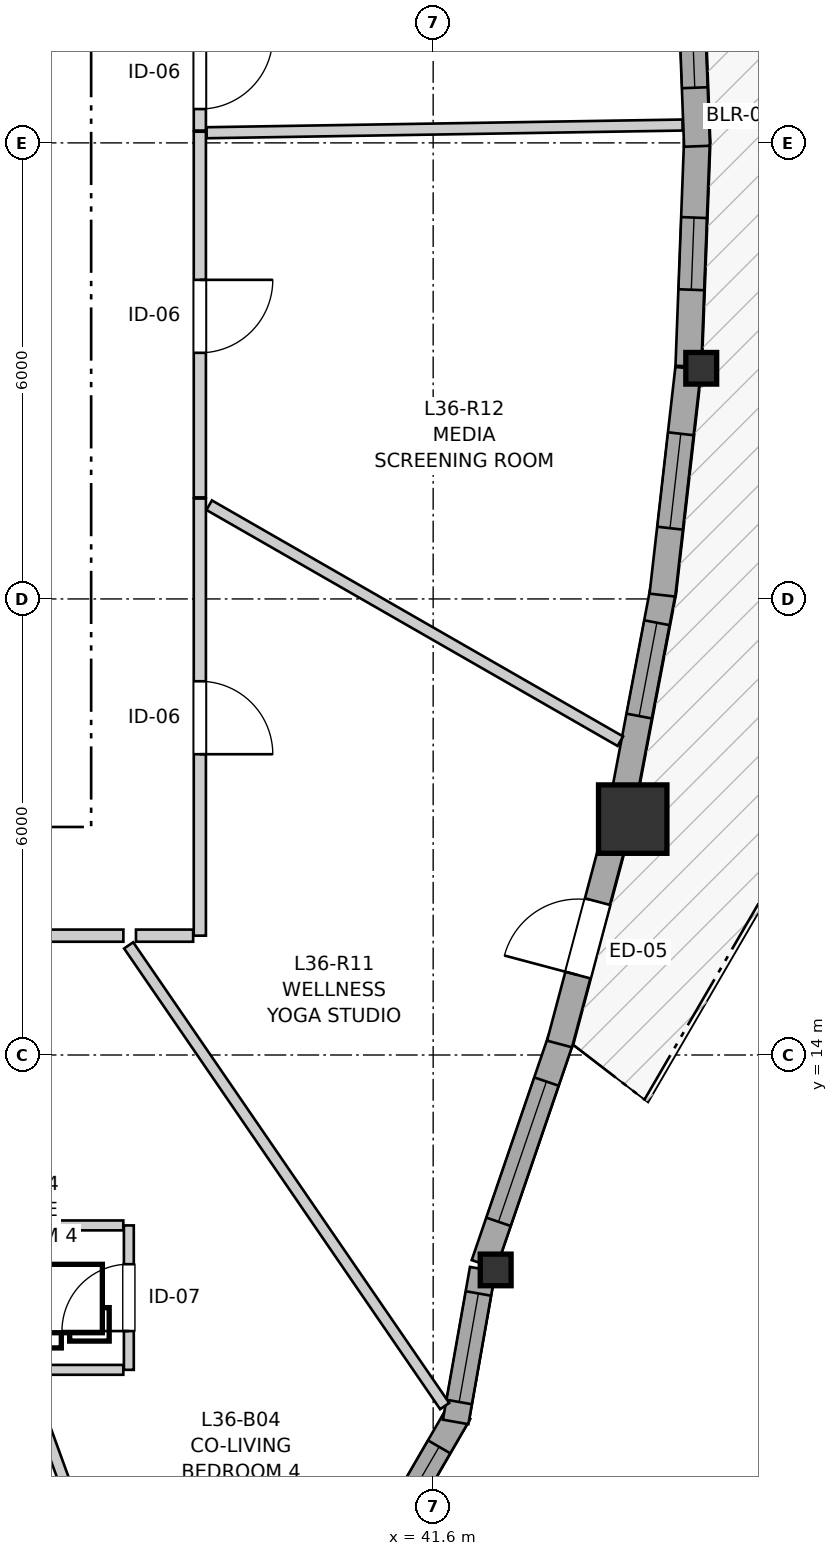
"""IFC4 building model, lengths in metres.
Left out: names, types, materials, properties, quantities, classifications, styles, units other than length and angle.
Written with IfcOpenShell. Run it as: python <this file> out.ifc"""

import sys

from ifc_helpers import new_model, si_unit, direction, frame, frame_2d, origin, origin_2d, place, context, subcontext, project, spatial, rectangle, i_section, extrude, source, transform, mapped, element, fill, save


model = new_model("IFC4")
c1 = context("Model", 3, precision=1e-05, world=origin(), true_north=direction((0.0, 1.0)))
c2 = subcontext(c1, "Body", "Model", "MODEL_VIEW")
j1 = project(units=[si_unit("LENGTHUNIT", "METRE"), si_unit("PLANEANGLEUNIT", "RADIAN")], contexts=[c1])
p1 = place(None, origin())
s1 = spatial("IfcSite", under=j1, at=p1, CompositionType="ELEMENT")
p2 = place(p1, origin())
s2 = spatial("IfcBuilding", under=s1, at=p2, CompositionType="ELEMENT")
p3 = place(p2, frame((0.0, 0.0, 121.6)))
s3 = spatial("IfcBuildingStorey", under=s2, at=p3, CompositionType="ELEMENT", Elevation=121.6)
m1 = source(origin(), c2, "Body", "SweptSolid", [
    extrude(i_section(OverallWidth=0.406, OverallDepth=0.416, WebThickness=0.027, FlangeThickness=0.044, FilletRadius=0.015, at=origin_2d()), origin(), (0.0, 0.0, 1.0), 2.95),
])
p4 = place(p3, frame((42.423, 11.172, 0.0), z_axis=(0.0, 0.0, 1.0), x_axis=(1.0, 0.0, 0.0)))
e1 = element("IfcColumn", 1, at=p4, inside=s3, PredefinedType="PILASTER", context=c2, shape_type="MappedRepresentation", body=[
    mapped(m1, transform((0.0, 0.0, 0.0), x_axis=(1.0, 0.0, 0.0), y_axis=(0.0, 1.0, 0.0), z_axis=(0.0, 0.0, 1.0), scale=1.0)),
])
m2 = source(origin(), c2, "Body", "SweptSolid", [
    extrude(rectangle(XDim=0.9, YDim=0.9, at=origin_2d()), origin(), (0.0, 0.0, 1.0), 2.95),
])
p5 = place(p3, frame((44.226, 17.104, 0.0), z_axis=(0.0, 0.0, 1.0), x_axis=(1.0, 0.0, 0.0)))
e2 = element("IfcColumn", 2, at=p5, inside=s3, PredefinedType="COLUMN", context=c2, shape_type="MappedRepresentation", body=[
    mapped(m2, transform((0.0, 0.0, 0.0), x_axis=(1.0, 0.0, 0.0), y_axis=(0.0, 1.0, 0.0), z_axis=(0.0, 0.0, 1.0), scale=1.0)),
])
p6 = place(p3, frame((45.127, 23.034, 0.0), z_axis=(0.0, 0.0, 1.0), x_axis=(1.0, 0.0, 0.0)))
e3 = element("IfcColumn", 3, at=p6, inside=s3, PredefinedType="PILASTER", context=c2, shape_type="MappedRepresentation", body=[
    mapped(m1, transform((0.0, 0.0, 0.0), x_axis=(1.0, 0.0, 0.0), y_axis=(0.0, 1.0, 0.0), z_axis=(0.0, 0.0, 1.0), scale=1.0)),
])
p7 = place(p3, frame((40.888, 7.483, 0.0), z_axis=(0.0, 0.0, 1.0), x_axis=(0.501902596059, 0.864924149315, 0.0)))
e4 = element("IfcWall", 4, at=p7, inside=s3, PredefinedType="SOLIDWALL", context=c2, shape_type="SweptSolid", body=[
    extrude(rectangle(XDim=2.099, YDim=0.34, at=frame_2d((1.049, 0.0))), origin(), (0.0, 0.0, 1.0), 2.48),
])
p8 = place(p7, frame((0.524, 0.0, 0.82)))
e5 = element("IfcOpeningElement", 5, at=p8, cuts=e4, PredefinedType="OPENING", context=c2, shape_type="SweptSolid", body=[
    extrude(rectangle(XDim=1.05, YDim=1.45, at=frame_2d((0.525, 0.725))), frame((0.0, 0.18, 0.0), z_axis=(0.0, -1.0, 0.0), x_axis=(1.0, 0.0, 0.0)), (0.0, 0.0, 1.0), 0.36),
])
p9 = place(p3, frame((41.896, 9.173, 0.0), z_axis=(0.0, 0.0, 1.0), x_axis=(0.174399433509, 0.984674990843, 0.0)))
e6 = element("IfcWall", 6, at=p9, inside=s3, PredefinedType="SOLIDWALL", context=c2, shape_type="SweptSolid", body=[
    extrude(rectangle(XDim=2.041, YDim=0.34, at=frame_2d((1.021, 0.0))), origin(), (0.0, 0.0, 1.0), 2.48),
])
p10 = place(p9, frame((0.267, 0.0, 0.82)))
e7 = element("IfcOpeningElement", 7, at=p10, cuts=e6, PredefinedType="OPENING", context=c2, shape_type="SweptSolid", body=[
    extrude(rectangle(XDim=1.45, YDim=1.25, at=frame_2d((0.725, 0.625))), frame((0.0, 0.18, 0.0), z_axis=(0.0, -1.0, 0.0), x_axis=(1.0, 0.0, 0.0)), (0.0, 0.0, 1.0), 0.36),
])
p11 = place(p3, frame((42.268, 11.246, 0.0), z_axis=(0.0, 0.0, 1.0), x_axis=(0.323583674973, 0.946199558915, 0.0)))
e8 = element("IfcWall", 8, at=p11, inside=s3, PredefinedType="SOLIDWALL", context=c2, shape_type="SweptSolid", body=[
    extrude(rectangle(XDim=3.152, YDim=0.34, at=frame_2d((1.576, 0.0))), origin(), (0.0, 0.0, 1.0), 2.48),
])
p12 = place(p11, frame((0.591, 0.0, 0.82)))
e9 = element("IfcOpeningElement", 9, at=p12, cuts=e8, PredefinedType="OPENING", context=c2, shape_type="SweptSolid", body=[
    extrude(rectangle(XDim=1.95, YDim=1.4, at=frame_2d((0.975, 0.7))), frame((0.0, 0.18, 0.0), z_axis=(0.0, -1.0, 0.0), x_axis=(1.0, 0.0, 0.0)), (0.0, 0.0, 1.0), 0.36),
])
p13 = place(p3, frame((43.263, 14.145, 0.0), z_axis=(0.0, 0.0, 1.0), x_axis=(0.257086792151, 0.96638831807, 0.0)))
e10 = element("IfcWall", 10, at=p13, inside=s3, PredefinedType="SOLIDWALL", context=c2, shape_type="SweptSolid", body=[
    extrude(rectangle(XDim=2.876, YDim=0.34, at=frame_2d((1.438, 0.0))), origin(), (0.0, 0.0, 1.0), 2.48),
])
p14 = place(p13, frame((0.938, 0.0, 0.0)))
e11 = element("IfcOpeningElement", 11, at=p14, cuts=e10, PredefinedType="OPENING", context=c2, shape_type="SweptSolid", body=[
    extrude(rectangle(XDim=1.0, YDim=2.1, at=frame_2d((0.5, 1.05))), frame((0.0, 0.18, 0.0), z_axis=(0.0, -1.0, 0.0), x_axis=(1.0, 0.0, 0.0)), (0.0, 0.0, 1.0), 0.36),
])
p15 = place(p3, frame((44.101, 17.361, 0.0), z_axis=(0.0, 0.0, 1.0), x_axis=(0.186739007234, 0.982409559795, 0.0)))
e12 = element("IfcWall", 12, at=p15, inside=s3, PredefinedType="SOLIDWALL", context=c2, shape_type="SweptSolid", body=[
    extrude(rectangle(XDim=2.827, YDim=0.34, at=frame_2d((1.413, 0.0))), origin(), (0.0, 0.0, 1.0), 2.48),
])
p16 = place(p15, frame((1.118, 0.0, 0.82)))
e13 = element("IfcOpeningElement", 13, at=p16, cuts=e12, PredefinedType="OPENING", context=c2, shape_type="SweptSolid", body=[
    extrude(rectangle(XDim=1.25, YDim=1.35, at=frame_2d((0.625, 0.675))), frame((0.0, 0.18, 0.0), z_axis=(0.0, -1.0, 0.0), x_axis=(1.0, 0.0, 0.0)), (0.0, 0.0, 1.0), 0.36),
])
p17 = place(p3, frame((44.616, 20.05, 0.0), z_axis=(0.0, 0.0, 1.0), x_axis=(0.113250801133, 0.993566432627, 0.0)))
e14 = element("IfcWall", 14, at=p17, inside=s3, PredefinedType="SOLIDWALL", context=c2, shape_type="SweptSolid", body=[
    extrude(rectangle(XDim=3.003, YDim=0.34, at=frame_2d((1.501, 0.0))), origin(), (0.0, 0.0, 1.0), 2.48),
])
p18 = place(p17, frame((0.886, 0.0, 0.82)))
e15 = element("IfcOpeningElement", 15, at=p18, cuts=e14, PredefinedType="OPENING", context=c2, shape_type="SweptSolid", body=[
    extrude(rectangle(XDim=1.25, YDim=1.35, at=frame_2d((0.625, 0.675))), frame((0.0, 0.18, 0.0), z_axis=(0.0, -1.0, 0.0), x_axis=(1.0, 0.0, 0.0)), (0.0, 0.0, 1.0), 0.36),
])
p19 = place(p3, frame((44.958, 23.061, 0.0), z_axis=(0.0, 0.0, 1.0), x_axis=(0.037940097137, 0.999280015326, 0.0)))
e16 = element("IfcWall", 16, at=p19, inside=s3, PredefinedType="SOLIDWALL", context=c2, shape_type="SweptSolid", body=[
    extrude(rectangle(XDim=2.986, YDim=0.34, at=frame_2d((1.493, 0.0))), origin(), (0.0, 0.0, 1.0), 2.48),
])
p20 = place(p19, frame((1.008, 0.0, 0.82)))
e17 = element("IfcOpeningElement", 17, at=p20, cuts=e16, PredefinedType="OPENING", context=c2, shape_type="SweptSolid", body=[
    extrude(rectangle(XDim=0.95, YDim=1.35, at=frame_2d((0.475, 0.675))), frame((0.0, 0.18, 0.0), z_axis=(0.0, -1.0, 0.0), x_axis=(1.0, 0.0, 0.0)), (0.0, 0.0, 1.0), 0.36),
])
p21 = place(p3, frame((45.071, 25.956, 0.0), z_axis=(0.0, 0.0, 1.0), x_axis=(-0.037997361734, 0.999277839493, 0.0)))
e18 = element("IfcWall", 18, at=p21, inside=s3, PredefinedType="SOLIDWALL", context=c2, shape_type="SweptSolid", body=[
    extrude(rectangle(XDim=2.776, YDim=0.34, at=frame_2d((1.388, 0.0))), origin(), (0.0, 0.0, 1.0), 2.48),
])
p22 = place(p21, frame((0.771, 0.0, 0.82)))
e19 = element("IfcOpeningElement", 19, at=p22, cuts=e18, PredefinedType="OPENING", context=c2, shape_type="SweptSolid", body=[
    extrude(rectangle(XDim=1.45, YDim=1.25, at=frame_2d((0.725, 0.625))), frame((0.0, 0.18, 0.0), z_axis=(0.0, -1.0, 0.0), x_axis=(1.0, 0.0, 0.0)), (0.0, 0.0, 1.0), 0.36),
])
p23 = place(p3, frame((38.53, 21.321, 0.0), z_axis=(0.0, 0.0, 1.0), x_axis=(0.0, -1.0, 0.0)))
e20 = element("IfcWall", 20, at=p23, inside=s3, PredefinedType="PARTITIONING", context=c2, shape_type="SweptSolid", body=[
    extrude(rectangle(XDim=5.751, YDim=0.16, at=frame_2d((2.875, 0.0))), origin(), (0.0, 0.0, 1.0), 2.95),
])
p24 = place(p23, frame((2.404, 0.0, 0.0)))
e21 = element("IfcOpeningElement", 21, at=p24, cuts=e20, PredefinedType="OPENING", context=c2, shape_type="SweptSolid", body=[
    extrude(rectangle(XDim=0.96, YDim=2.1, at=frame_2d((0.48, 1.05))), frame((0.0, 0.09, 0.0), z_axis=(0.0, -1.0, 0.0), x_axis=(1.0, 0.0, 0.0)), (0.0, 0.0, 1.0), 0.18),
])
p25 = place(p3, frame((38.53, 26.147, 0.0), z_axis=(0.0, 0.0, 1.0), x_axis=(0.0, -1.0, 0.0)))
e22 = element("IfcWall", 22, at=p25, inside=s3, PredefinedType="PARTITIONING", context=c2, shape_type="SweptSolid", body=[
    extrude(rectangle(XDim=4.811, YDim=0.16, at=frame_2d((2.406, 0.0))), origin(), (0.0, 0.0, 1.0), 2.95),
])
p26 = place(p25, frame((1.949, 0.0, 0.0)))
e23 = element("IfcOpeningElement", 23, at=p26, cuts=e22, PredefinedType="OPENING", context=c2, shape_type="SweptSolid", body=[
    extrude(rectangle(XDim=0.96, YDim=2.1, at=frame_2d((0.48, 1.05))), frame((0.0, 0.09, 0.0), z_axis=(0.0, -1.0, 0.0), x_axis=(1.0, 0.0, 0.0)), (0.0, 0.0, 1.0), 0.18),
])
p27 = place(p3, frame((37.524, 15.57, 0.0), z_axis=(0.0, 0.0, 1.0), x_axis=(-1.0, 0.0, 0.0)))
e24 = element("IfcWall", 24, at=p27, inside=s3, PredefinedType="PARTITIONING", context=c2, shape_type="SweptSolid", body=[
    extrude(rectangle(XDim=3.401, YDim=0.16, at=frame_2d((1.7, 0.0))), origin(), (0.0, 0.0, 1.0), 2.95),
])
p28 = place(p27, frame((1.241, 0.0, 0.0)))
e25 = element("IfcOpeningElement", 25, at=p28, cuts=e24, PredefinedType="OPENING", context=c2, shape_type="SweptSolid", body=[
    extrude(rectangle(XDim=0.92, YDim=2.1, at=frame_2d((0.46, 1.05))), frame((0.0, 0.09, 0.0), z_axis=(0.0, -1.0, 0.0), x_axis=(1.0, 0.0, 0.0)), (0.0, 0.0, 1.0), 0.18),
])
p29 = place(p3, frame((37.596, 9.858, 0.0), z_axis=(0.0, 0.0, 1.0), x_axis=(0.0, 1.0, 0.0)))
e26 = element("IfcWall", 26, at=p29, inside=s3, PredefinedType="PARTITIONING", context=c2, shape_type="SweptSolid", body=[
    extrude(rectangle(XDim=1.9, YDim=0.13, at=frame_2d((0.95, 0.0))), origin(), (0.0, 0.0, 1.0), 2.95),
])
p30 = place(p29, frame((0.51, 0.0, 0.0)))
e27 = element("IfcOpeningElement", 27, at=p30, cuts=e26, PredefinedType="OPENING", context=c2, shape_type="SweptSolid", body=[
    extrude(rectangle(XDim=0.88, YDim=2.05, at=frame_2d((0.44, 1.025))), frame((0.0, 0.075, 0.0), z_axis=(0.0, -1.0, 0.0), x_axis=(1.0, 0.0, 0.0)), (0.0, 0.0, 1.0), 0.15),
])
p31 = place(p3, frame((38.53, 27.688, 0.0), z_axis=(0.0, 0.0, 1.0), x_axis=(0.0, -1.0, 0.0)))
e28 = element("IfcWall", 28, at=p31, inside=s3, PredefinedType="PARTITIONING", context=c2, shape_type="SweptSolid", body=[
    extrude(rectangle(XDim=1.526, YDim=0.16, at=frame_2d((0.763, 0.0))), origin(), (0.0, 0.0, 1.0), 2.95),
])
p32 = place(p31, frame((0.283, 0.0, 0.0)))
e29 = element("IfcOpeningElement", 29, at=p32, cuts=e28, PredefinedType="OPENING", context=c2, shape_type="SweptSolid", body=[
    extrude(rectangle(XDim=0.96, YDim=2.1, at=frame_2d((0.48, 1.05))), frame((0.0, 0.09, 0.0), z_axis=(0.0, -1.0, 0.0), x_axis=(1.0, 0.0, 0.0)), (0.0, 0.0, 1.0), 0.18),
])
p33 = place(p3, frame((37.594, 15.442, 0.0), z_axis=(0.0, 0.0, 1.0), x_axis=(0.565681325722, -0.824623937155, 0.0)))
e30 = element("IfcWall", 30, at=p33, inside=s3, PredefinedType="PARTITIONING", context=c2, shape_type="SweptSolid", body=[
    extrude(rectangle(XDim=7.35, YDim=0.145, at=frame_2d((3.675, 0.0))), origin(), (0.0, 0.0, 1.0), 2.95),
])
p34 = place(p3, frame((38.653, 21.233, 0.0), z_axis=(0.0, 0.0, 1.0), x_axis=(0.86726592845, -0.49784516604, 0.0)))
e31 = element("IfcWall", 31, at=p34, inside=s3, PredefinedType="PARTITIONING", context=c2, shape_type="SweptSolid", body=[
    extrude(rectangle(XDim=6.237, YDim=0.145, at=frame_2d((3.119, 0.0))), origin(), (0.0, 0.0, 1.0), 2.95),
])
p35 = place(p3, frame((38.619, 26.133, 0.0), z_axis=(0.0, 0.0, 1.0), x_axis=(0.999869130012, 0.016177850558, 0.0)))
e32 = element("IfcWall", 32, at=p35, inside=s3, PredefinedType="PARTITIONING", context=c2, shape_type="SweptSolid", body=[
    extrude(rectangle(XDim=6.263, YDim=0.145, at=frame_2d((3.131, 0.0))), origin(), (0.0, 0.0, 1.0), 2.95),
])
p36 = place(p3, frame((36.208, 9.873, 0.0), z_axis=(0.0, 0.0, 1.0), x_axis=(0.341362804218, -0.939931612351, 0.0)))
e33 = element("IfcWall", 33, at=p36, inside=s3, PredefinedType="PARTITIONING", context=c2, shape_type="SweptSolid", body=[
    extrude(rectangle(XDim=4.279, YDim=0.145, at=frame_2d((2.14, 0.0))), origin(), (0.0, 0.0, 1.0), 2.95),
])
p37 = place(p3, frame((35.796, 11.758, 0.0), z_axis=(0.0, 0.0, 1.0), x_axis=(1.0, 0.0, 0.0)))
e34 = element("IfcWall", 34, at=p37, inside=s3, PredefinedType="PARTITIONING", context=c2, shape_type="SweptSolid", body=[
    extrude(rectangle(XDim=1.727, YDim=0.13, at=frame_2d((0.864, 0.0))), origin(), (0.0, 0.0, 1.0), 2.95),
])
p38 = place(p3, frame((36.323, 9.858, 0.0), z_axis=(0.0, 0.0, 1.0), x_axis=(1.0, 0.0, 0.0)))
e35 = element("IfcWall", 35, at=p38, inside=s3, PredefinedType="PARTITIONING", context=c2, shape_type="SweptSolid", body=[
    extrude(rectangle(XDim=1.2, YDim=0.13, at=frame_2d((0.6, 0.0))), origin(), (0.0, 0.0, 1.0), 2.95),
])
p39 = place(p3, frame((37.69, 15.57, 0.0), z_axis=(0.0, 0.0, 1.0), x_axis=(1.0, 0.0, 0.0)))
e36 = element("IfcWall", 36, at=p39, inside=s3, PredefinedType="PARTITIONING", context=c2, shape_type="SweptSolid", body=[
    extrude(rectangle(XDim=0.752, YDim=0.16, at=frame_2d((0.376, 0.0))), origin(), (0.0, 0.0, 1.0), 2.95),
])
m3 = source(origin(), c2, "Body", "SweptSolid", [
    extrude(rectangle(XDim=1.05, YDim=1.45, at=frame_2d((0.525, 0.725))), frame((0.0, 0.03, 0.0), z_axis=(0.0, -1.0, 0.0), x_axis=(1.0, 0.0, 0.0)), (0.0, 0.0, 1.0), 0.06),
])
p40 = place(p8, origin())
e37 = element("IfcWindow", 37, at=p40, inside=s3, PartitioningType="SINGLE_PANEL", PredefinedType="WINDOW", context=c2, shape_type="MappedRepresentation", body=[
    mapped(m3, transform((0.0, 0.0, 0.0), x_axis=(1.0, 0.0, 0.0), y_axis=(0.0, 1.0, 0.0), z_axis=(0.0, 0.0, 1.0), scale=1.0)),
])
fill(e5, e37)
m4 = source(origin(), c2, "Body", "SweptSolid", [
    extrude(rectangle(XDim=1.45, YDim=1.25, at=frame_2d((0.725, 0.625))), frame((0.0, 0.03, 0.0), z_axis=(0.0, -1.0, 0.0), x_axis=(1.0, 0.0, 0.0)), (0.0, 0.0, 1.0), 0.06),
])
p41 = place(p10, origin())
e38 = element("IfcWindow", 38, at=p41, inside=s3, PartitioningType="SINGLE_PANEL", PredefinedType="WINDOW", context=c2, shape_type="MappedRepresentation", body=[
    mapped(m4, transform((0.0, 0.0, 0.0), x_axis=(1.0, 0.0, 0.0), y_axis=(0.0, 1.0, 0.0), z_axis=(0.0, 0.0, 1.0), scale=1.0)),
])
fill(e7, e38)
m5 = source(origin(), c2, "Body", "SweptSolid", [
    extrude(rectangle(XDim=1.95, YDim=1.4, at=frame_2d((0.975, 0.7))), frame((0.0, 0.03, 0.0), z_axis=(0.0, -1.0, 0.0), x_axis=(1.0, 0.0, 0.0)), (0.0, 0.0, 1.0), 0.06),
])
p42 = place(p12, origin())
e39 = element("IfcWindow", 39, at=p42, inside=s3, PartitioningType="SINGLE_PANEL", PredefinedType="WINDOW", context=c2, shape_type="MappedRepresentation", body=[
    mapped(m5, transform((0.0, 0.0, 0.0), x_axis=(1.0, 0.0, 0.0), y_axis=(0.0, 1.0, 0.0), z_axis=(0.0, 0.0, 1.0), scale=1.0)),
])
fill(e9, e39)
m6 = source(origin(), c2, "Body", "SweptSolid", [
    extrude(rectangle(XDim=1.25, YDim=1.35, at=frame_2d((0.625, 0.675))), frame((0.0, 0.03, 0.0), z_axis=(0.0, -1.0, 0.0), x_axis=(1.0, 0.0, 0.0)), (0.0, 0.0, 1.0), 0.06),
])
p43 = place(p16, origin())
e40 = element("IfcWindow", 40, at=p43, inside=s3, PartitioningType="SINGLE_PANEL", PredefinedType="WINDOW", context=c2, shape_type="MappedRepresentation", body=[
    mapped(m6, transform((0.0, 0.0, 0.0), x_axis=(1.0, 0.0, 0.0), y_axis=(0.0, 1.0, 0.0), z_axis=(0.0, 0.0, 1.0), scale=1.0)),
])
fill(e13, e40)
p44 = place(p18, origin())
e41 = element("IfcWindow", 41, at=p44, inside=s3, PartitioningType="SINGLE_PANEL", PredefinedType="WINDOW", context=c2, shape_type="MappedRepresentation", body=[
    mapped(m6, transform((0.0, 0.0, 0.0), x_axis=(1.0, 0.0, 0.0), y_axis=(0.0, 1.0, 0.0), z_axis=(0.0, 0.0, 1.0), scale=1.0)),
])
fill(e15, e41)
m7 = source(origin(), c2, "Body", "SweptSolid", [
    extrude(rectangle(XDim=0.95, YDim=1.35, at=frame_2d((0.475, 0.675))), frame((0.0, 0.03, 0.0), z_axis=(0.0, -1.0, 0.0), x_axis=(1.0, 0.0, 0.0)), (0.0, 0.0, 1.0), 0.06),
])
p45 = place(p20, origin())
e42 = element("IfcWindow", 42, at=p45, inside=s3, PartitioningType="SINGLE_PANEL", PredefinedType="WINDOW", context=c2, shape_type="MappedRepresentation", body=[
    mapped(m7, transform((0.0, 0.0, 0.0), x_axis=(1.0, 0.0, 0.0), y_axis=(0.0, 1.0, 0.0), z_axis=(0.0, 0.0, 1.0), scale=1.0)),
])
fill(e17, e42)
p46 = place(p22, origin())
e43 = element("IfcWindow", 43, at=p46, inside=s3, PartitioningType="SINGLE_PANEL", PredefinedType="WINDOW", context=c2, shape_type="MappedRepresentation", body=[
    mapped(m4, transform((0.0, 0.0, 0.0), x_axis=(1.0, 0.0, 0.0), y_axis=(0.0, 1.0, 0.0), z_axis=(0.0, 0.0, 1.0), scale=1.0)),
])
fill(e19, e43)
m8 = source(origin(), c2, "Body", "SweptSolid", [
    extrude(rectangle(XDim=1.0, YDim=2.1, at=frame_2d((0.5, 1.05))), frame((0.0, 0.025, 0.0), z_axis=(0.0, -1.0, 0.0), x_axis=(1.0, 0.0, 0.0)), (0.0, 0.0, 1.0), 0.05),
])
p47 = place(p14, origin())
e44 = element("IfcDoor", 44, at=p47, inside=s3, OperationType="SINGLE_SWING_LEFT", PredefinedType="DOOR", context=c2, shape_type="MappedRepresentation", body=[
    mapped(m8, transform((0.0, 0.0, 0.0), x_axis=(1.0, 0.0, 0.0), y_axis=(0.0, 1.0, 0.0), z_axis=(0.0, 0.0, 1.0), scale=1.0)),
])
fill(e11, e44)
m9 = source(origin(), c2, "Body", "SweptSolid", [
    extrude(rectangle(XDim=0.96, YDim=2.1, at=frame_2d((0.48, 1.05))), frame((0.0, 0.025, 0.0), z_axis=(0.0, -1.0, 0.0), x_axis=(1.0, 0.0, 0.0)), (0.0, 0.0, 1.0), 0.05),
])
p48 = place(p24, origin())
e45 = element("IfcDoor", 45, at=p48, inside=s3, OperationType="SINGLE_SWING_RIGHT", PredefinedType="DOOR", context=c2, shape_type="MappedRepresentation", body=[
    mapped(m9, transform((0.0, 0.0, 0.0), x_axis=(1.0, 0.0, 0.0), y_axis=(0.0, 1.0, 0.0), z_axis=(0.0, 0.0, 1.0), scale=1.0)),
])
fill(e21, e45)
p49 = place(p26, origin())
e46 = element("IfcDoor", 46, at=p49, inside=s3, OperationType="SINGLE_SWING_LEFT", PredefinedType="DOOR", context=c2, shape_type="MappedRepresentation", body=[
    mapped(m9, transform((0.0, 0.0, 0.0), x_axis=(1.0, 0.0, 0.0), y_axis=(0.0, 1.0, 0.0), z_axis=(0.0, 0.0, 1.0), scale=1.0)),
])
fill(e23, e46)
m10 = source(origin(), c2, "Body", "SweptSolid", [
    extrude(rectangle(XDim=0.88, YDim=2.05, at=frame_2d((0.44, 1.025))), frame((0.0, 0.025, 0.0), z_axis=(0.0, -1.0, 0.0), x_axis=(1.0, 0.0, 0.0)), (0.0, 0.0, 1.0), 0.05),
])
p50 = place(p30, origin())
e47 = element("IfcDoor", 47, at=p50, inside=s3, OperationType="SINGLE_SWING_LEFT", PredefinedType="DOOR", context=c2, shape_type="MappedRepresentation", body=[
    mapped(m10, transform((0.0, 0.0, 0.0), x_axis=(1.0, 0.0, 0.0), y_axis=(0.0, 1.0, 0.0), z_axis=(0.0, 0.0, 1.0), scale=1.0)),
])
fill(e27, e47)
p51 = place(p32, origin())
e48 = element("IfcDoor", 48, at=p51, inside=s3, OperationType="SINGLE_SWING_LEFT", PredefinedType="DOOR", context=c2, shape_type="MappedRepresentation", body=[
    mapped(m9, transform((0.0, 0.0, 0.0), x_axis=(1.0, 0.0, 0.0), y_axis=(0.0, 1.0, 0.0), z_axis=(0.0, 0.0, 1.0), scale=1.0)),
])
fill(e29, e48)
save(model, sys.argv[1])
